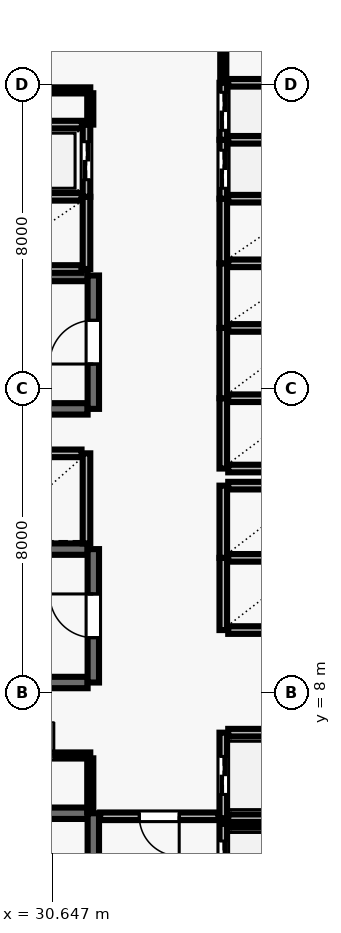
"""IFC4 building model, lengths in metres.
Left out: names, types, materials, properties, quantities, classifications, styles, units other than length and angle.
Written with IfcOpenShell. Run it as: python <this file> out.ifc"""

import sys

from ifc_helpers import new_model, si_unit, direction, frame, frame_2d, origin, place, context, subcontext, project, spatial, rectangle, extrude, element, fill, save


model = new_model("IFC4")
c1 = context("Model", 3, precision=1e-05, world=origin(), true_north=direction((0.0, 1.0)))
c2 = subcontext(c1, "Body", "Model", "MODEL_VIEW")
j1 = project(units=[si_unit("LENGTHUNIT", "METRE"), si_unit("PLANEANGLEUNIT", "RADIAN")], contexts=[c1])
p1 = place(None, origin())
s1 = spatial("IfcSite", under=j1, at=p1, CompositionType="ELEMENT")
p2 = place(p1, origin())
s2 = spatial("IfcBuilding", under=s1, at=p2, CompositionType="ELEMENT")
p3 = place(p2, frame((0.0, 0.0, 58.3)))
s3 = spatial("IfcBuildingStorey", under=s2, at=p3, CompositionType="ELEMENT", Elevation=58.3)
p4 = place(p3, frame((31.58, 4.83, 0.0), z_axis=(0.0, 0.0, 1.0), x_axis=(-1.0, 0.0, 0.0)))
e1 = element("IfcWall", 1, at=p4, inside=s3, PredefinedType="SHEAR", context=c2, shape_type="SweptSolid", body=[
    extrude(rectangle(XDim=8.36, YDim=0.3, at=frame_2d((4.18, 0.0))), origin(), (0.0, 0.0, 1.0), 3.69),
])
p5 = place(p3, frame((31.73, 0.96, 0.0), z_axis=(0.0, 0.0, 1.0), x_axis=(0.0, 1.0, 0.0)))
e2 = element("IfcWall", 2, at=p5, inside=s3, PredefinedType="SHEAR", context=c2, shape_type="SweptSolid", body=[
    extrude(rectangle(XDim=3.87, YDim=0.3, at=frame_2d((1.935, 0.0))), origin(), (0.0, 0.0, 1.0), 3.69),
])
p6 = place(p5, frame((1.54, 0.0, 0.0)))
e3 = element("IfcOpeningElement", 3, at=p6, cuts=e2, PredefinedType="OPENING", context=c2, shape_type="SweptSolid", body=[
    extrude(rectangle(XDim=1.15, YDim=2.15, at=frame_2d((0.575, 1.075))), frame((0.0, 0.16, 0.0), z_axis=(0.0, -1.0, 0.0), x_axis=(1.0, 0.0, 0.0)), (0.0, 0.0, 1.0), 0.32),
])
for number, where, z_axis, x_axis in (
    (4, (31.58, 18.98, 0.0), (0.0, 0.0, 1.0), (-1.0, 0.0, 0.0)),
    (5, (23.22, 15.47, 0.0), (0.0, 0.0, 1.0), (1.0, 0.0, 0.0)),
):
    element("IfcWall", number, at=place(p3, frame(where, z_axis=z_axis, x_axis=x_axis)), inside=s3, PredefinedType="SHEAR", context=c2, shape_type="SweptSolid", body=[
        extrude(rectangle(XDim=8.36, YDim=0.3, at=frame_2d((4.18, 0.0))), origin(), (0.0, 0.0, 1.0), 3.69),
    ])
p7 = place(p3, frame((31.73, 15.47, 0.0), z_axis=(0.0, 0.0, 1.0), x_axis=(0.0, 1.0, 0.0)))
e6 = element("IfcWall", 6, at=p7, inside=s3, PredefinedType="SHEAR", context=c2, shape_type="SweptSolid", body=[
    extrude(rectangle(XDim=3.51, YDim=0.3, at=frame_2d((1.755, 0.0))), origin(), (0.0, 0.0, 1.0), 3.69),
])
p8 = place(p7, frame((1.18, 0.0, 0.0)))
e7 = element("IfcOpeningElement", 7, at=p8, cuts=e6, PredefinedType="OPENING", context=c2, shape_type="SweptSolid", body=[
    extrude(rectangle(XDim=1.15, YDim=2.15, at=frame_2d((0.575, 1.075))), frame((0.0, 0.16, 0.0), z_axis=(0.0, -1.0, 0.0), x_axis=(1.0, 0.0, 0.0)), (0.0, 0.0, 1.0), 0.32),
])
for number, where, z_axis, x_axis in (
    (8, (31.58, 11.78, 0.0), (0.0, 0.0, 1.0), (-1.0, 0.0, 0.0)),
    (9, (23.22, 8.27, 0.0), (0.0, 0.0, 1.0), (1.0, 0.0, 0.0)),
):
    element("IfcWall", number, at=place(p3, frame(where, z_axis=z_axis, x_axis=x_axis)), inside=s3, PredefinedType="SHEAR", context=c2, shape_type="SweptSolid", body=[
        extrude(rectangle(XDim=8.36, YDim=0.3, at=frame_2d((4.18, 0.0))), origin(), (0.0, 0.0, 1.0), 3.69),
    ])
p9 = place(p3, frame((31.73, 8.27, 0.0), z_axis=(0.0, 0.0, 1.0), x_axis=(0.0, 1.0, 0.0)))
e10 = element("IfcWall", 10, at=p9, inside=s3, PredefinedType="SHEAR", context=c2, shape_type="SweptSolid", body=[
    extrude(rectangle(XDim=3.51, YDim=0.3, at=frame_2d((1.755, 0.0))), origin(), (0.0, 0.0, 1.0), 3.69),
])
p10 = place(p9, frame((1.18, 0.0, 0.0)))
e11 = element("IfcOpeningElement", 11, at=p10, cuts=e10, PredefinedType="OPENING", context=c2, shape_type="SweptSolid", body=[
    extrude(rectangle(XDim=1.15, YDim=2.15, at=frame_2d((0.575, 1.075))), frame((0.0, 0.16, 0.0), z_axis=(0.0, -1.0, 0.0), x_axis=(1.0, 0.0, 0.0)), (0.0, 0.0, 1.0), 0.32),
])
p11 = place(p3, frame((35.15, 4.55, 0.0), z_axis=(0.0, 0.0, 1.0), x_axis=(0.0, -1.0, 0.0)))
e12 = element("IfcWall", 12, at=p11, inside=s3, PredefinedType="SOLIDWALL", context=c2, shape_type="SweptSolid", body=[
    extrude(rectangle(XDim=2.1, YDim=0.2, at=frame_2d((1.05, 0.0))), origin(), (0.0, 0.0, 1.0), 3.69),
])
p12 = place(p11, frame((0.45, 0.0, 0.0)))
e13 = element("IfcOpeningElement", 13, at=p12, cuts=e12, PredefinedType="OPENING", context=c2, shape_type="SweptSolid", body=[
    extrude(rectangle(XDim=1.2, YDim=2.15, at=frame_2d((0.6, 1.075))), frame((0.0, 0.11, 0.0), z_axis=(0.0, -1.0, 0.0), x_axis=(1.0, 0.0, 0.0)), (0.0, 0.0, 1.0), 0.22),
])
p13 = place(p3, frame((37.42, 4.55, 0.0), z_axis=(0.0, 0.0, 1.0), x_axis=(-1.0, 0.0, 0.0)))
e14 = element("IfcWall", 14, at=p13, inside=s3, PredefinedType="SOLIDWALL", context=c2, shape_type="SweptSolid", body=[
    extrude(rectangle(XDim=2.14, YDim=0.2, at=frame_2d((1.07, 0.0))), origin(), (0.0, 0.0, 1.0), 3.69),
])
p14 = place(p3, frame((35.15, 6.95, 0.0), z_axis=(0.0, 0.0, 1.0), x_axis=(0.0, -1.0, 0.0)))
e15 = element("IfcWall", 15, at=p14, inside=s3, PredefinedType="SOLIDWALL", context=c2, shape_type="SweptSolid", body=[
    extrude(rectangle(XDim=2.25, YDim=0.2, at=frame_2d((1.125, 0.0))), origin(), (0.0, 0.0, 1.0), 3.69),
])
p15 = place(p14, frame((0.625, 0.0, 0.0)))
e16 = element("IfcOpeningElement", 16, at=p15, cuts=e15, PredefinedType="OPENING", context=c2, shape_type="SweptSolid", body=[
    extrude(rectangle(XDim=1.0, YDim=2.1, at=frame_2d((0.5, 1.05))), frame((0.0, 0.11, 0.0), z_axis=(0.0, -1.0, 0.0), x_axis=(1.0, 0.0, 0.0)), (0.0, 0.0, 1.0), 0.22),
])
for number, where, z_axis, x_axis in (
    (17, (35.28, 4.7, 0.0), (0.0, 0.0, 1.0), (1.0, 0.0, 0.0)),
    (18, (37.42, 6.95, 0.0), (0.0, 0.0, 1.0), (-1.0, 0.0, 0.0)),
):
    element("IfcWall", number, at=place(p3, frame(where, z_axis=z_axis, x_axis=x_axis)), inside=s3, PredefinedType="SOLIDWALL", context=c2, shape_type="SweptSolid", body=[
        extrude(rectangle(XDim=2.14, YDim=0.2, at=frame_2d((1.07, 0.0))), origin(), (0.0, 0.0, 1.0), 3.69),
    ])
p16 = place(p3, frame((35.15, 11.55, 0.0), z_axis=(0.0, 0.0, 1.0), x_axis=(0.0, -1.0, 0.0)))
e19 = element("IfcWall", 19, at=p16, inside=s3, PredefinedType="SOLIDWALL", context=c2, shape_type="SweptSolid", body=[
    extrude(rectangle(XDim=1.9, YDim=0.2, at=frame_2d((0.95, 0.0))), origin(), (0.0, 0.0, 1.0), 3.69),
])
for number, where, z_axis, x_axis in (
    (20, (35.28, 9.65, 0.0), (0.0, 0.0, 1.0), (1.0, 0.0, 0.0)),
    (21, (37.42, 11.55, 0.0), (0.0, 0.0, 1.0), (-1.0, 0.0, 0.0)),
):
    element("IfcWall", number, at=place(p3, frame(where, z_axis=z_axis, x_axis=x_axis)), inside=s3, PredefinedType="SOLIDWALL", context=c2, shape_type="SweptSolid", body=[
        extrude(rectangle(XDim=2.14, YDim=0.2, at=frame_2d((1.07, 0.0))), origin(), (0.0, 0.0, 1.0), 3.69),
    ])
p17 = place(p3, frame((35.15, 13.45, 0.0), z_axis=(0.0, 0.0, 1.0), x_axis=(0.0, -1.0, 0.0)))
e22 = element("IfcWall", 22, at=p17, inside=s3, PredefinedType="SOLIDWALL", context=c2, shape_type="SweptSolid", body=[
    extrude(rectangle(XDim=1.9, YDim=0.2, at=frame_2d((0.95, 0.0))), origin(), (0.0, 0.0, 1.0), 3.69),
])
p18 = place(p3, frame((37.42, 13.45, 0.0), z_axis=(0.0, 0.0, 1.0), x_axis=(-1.0, 0.0, 0.0)))
e23 = element("IfcWall", 23, at=p18, inside=s3, PredefinedType="SOLIDWALL", context=c2, shape_type="SweptSolid", body=[
    extrude(rectangle(XDim=2.14, YDim=0.2, at=frame_2d((1.07, 0.0))), origin(), (0.0, 0.0, 1.0), 3.69),
])
p19 = place(p3, frame((31.55, 11.93, 0.0), z_axis=(0.0, 0.0, 1.0), x_axis=(0.0, 1.0, 0.0)))
e24 = element("IfcWall", 24, at=p19, inside=s3, PredefinedType="SOLIDWALL", context=c2, shape_type="SweptSolid", body=[
    extrude(rectangle(XDim=2.37, YDim=0.2, at=frame_2d((1.185, 0.0))), origin(), (0.0, 0.0, 1.0), 3.69),
])
p20 = place(p3, frame((31.42, 14.3, 0.0), z_axis=(0.0, 0.0, 1.0), x_axis=(-1.0, 0.0, 0.0)))
e25 = element("IfcWall", 25, at=p20, inside=s3, PredefinedType="SOLIDWALL", context=c2, shape_type="SweptSolid", body=[
    extrude(rectangle(XDim=2.44, YDim=0.2, at=frame_2d((1.22, 0.0))), origin(), (0.0, 0.0, 1.0), 3.69),
])
p21 = place(p3, frame((35.15, 15.75, 0.0), z_axis=(0.0, 0.0, 1.0), x_axis=(0.0, -1.0, 0.0)))
e26 = element("IfcWall", 26, at=p21, inside=s3, PredefinedType="SOLIDWALL", context=c2, shape_type="SweptSolid", body=[
    extrude(rectangle(XDim=1.85, YDim=0.2, at=frame_2d((0.925, 0.0))), origin(), (0.0, 0.0, 1.0), 3.69),
])
for number, where, z_axis, x_axis in (
    (27, (35.28, 13.9, 0.0), (0.0, 0.0, 1.0), (1.0, 0.0, 0.0)),
    (28, (37.42, 15.75, 0.0), (0.0, 0.0, 1.0), (-1.0, 0.0, 0.0)),
):
    element("IfcWall", number, at=place(p3, frame(where, z_axis=z_axis, x_axis=x_axis)), inside=s3, PredefinedType="SOLIDWALL", context=c2, shape_type="SweptSolid", body=[
        extrude(rectangle(XDim=2.14, YDim=0.2, at=frame_2d((1.07, 0.0))), origin(), (0.0, 0.0, 1.0), 3.69),
    ])
p22 = place(p3, frame((35.15, 17.6, 0.0), z_axis=(0.0, 0.0, 1.0), x_axis=(0.0, -1.0, 0.0)))
e29 = element("IfcWall", 29, at=p22, inside=s3, PredefinedType="SOLIDWALL", context=c2, shape_type="SweptSolid", body=[
    extrude(rectangle(XDim=1.85, YDim=0.2, at=frame_2d((0.925, 0.0))), origin(), (0.0, 0.0, 1.0), 3.69),
])
p23 = place(p3, frame((37.42, 17.6, 0.0), z_axis=(0.0, 0.0, 1.0), x_axis=(-1.0, 0.0, 0.0)))
e30 = element("IfcWall", 30, at=p23, inside=s3, PredefinedType="SOLIDWALL", context=c2, shape_type="SweptSolid", body=[
    extrude(rectangle(XDim=2.14, YDim=0.2, at=frame_2d((1.07, 0.0))), origin(), (0.0, 0.0, 1.0), 3.69),
])
p24 = place(p3, frame((35.15, 19.3, 0.0), z_axis=(0.0, 0.0, 1.0), x_axis=(0.0, -1.0, 0.0)))
e31 = element("IfcWall", 31, at=p24, inside=s3, PredefinedType="SOLIDWALL", context=c2, shape_type="SweptSolid", body=[
    extrude(rectangle(XDim=1.7, YDim=0.2, at=frame_2d((0.85, 0.0))), origin(), (0.0, 0.0, 1.0), 3.69),
])
p25 = place(p3, frame((37.42, 19.3, 0.0), z_axis=(0.0, 0.0, 1.0), x_axis=(-1.0, 0.0, 0.0)))
e32 = element("IfcWall", 32, at=p25, inside=s3, PredefinedType="SOLIDWALL", context=c2, shape_type="SweptSolid", body=[
    extrude(rectangle(XDim=2.14, YDim=0.2, at=frame_2d((1.07, 0.0))), origin(), (0.0, 0.0, 1.0), 3.69),
])
p26 = place(p3, frame((35.15, 21.0, 0.0), z_axis=(0.0, 0.0, 1.0), x_axis=(0.0, -1.0, 0.0)))
e33 = element("IfcWall", 33, at=p26, inside=s3, PredefinedType="SOLIDWALL", context=c2, shape_type="SweptSolid", body=[
    extrude(rectangle(XDim=1.7, YDim=0.2, at=frame_2d((0.85, 0.0))), origin(), (0.0, 0.0, 1.0), 3.69),
])
p27 = place(p3, frame((37.42, 21.0, 0.0), z_axis=(0.0, 0.0, 1.0), x_axis=(-1.0, 0.0, 0.0)))
e34 = element("IfcWall", 34, at=p27, inside=s3, PredefinedType="SOLIDWALL", context=c2, shape_type="SweptSolid", body=[
    extrude(rectangle(XDim=2.14, YDim=0.2, at=frame_2d((1.07, 0.0))), origin(), (0.0, 0.0, 1.0), 3.69),
])
p28 = place(p3, frame((31.55, 19.15, 0.0), z_axis=(0.0, 0.0, 1.0), x_axis=(0.0, 1.0, 0.0)))
e35 = element("IfcWall", 35, at=p28, inside=s3, PredefinedType="SOLIDWALL", context=c2, shape_type="SweptSolid", body=[
    extrude(rectangle(XDim=1.9, YDim=0.2, at=frame_2d((0.95, 0.0))), origin(), (0.0, 0.0, 1.0), 3.69),
])
for number, where, z_axis, x_axis in (
    (36, (28.98, 19.15, 0.0), (0.0, 0.0, 1.0), (1.0, 0.0, 0.0)),
    (37, (31.42, 21.05, 0.0), (0.0, 0.0, 1.0), (-1.0, 0.0, 0.0)),
):
    element("IfcWall", number, at=place(p3, frame(where, z_axis=z_axis, x_axis=x_axis)), inside=s3, PredefinedType="SOLIDWALL", context=c2, shape_type="SweptSolid", body=[
        extrude(rectangle(XDim=2.44, YDim=0.2, at=frame_2d((1.22, 0.0))), origin(), (0.0, 0.0, 1.0), 3.69),
    ])
p29 = place(p3, frame((35.15, 22.55, 0.0), z_axis=(0.0, 0.0, 1.0), x_axis=(0.0, -1.0, 0.0)))
e38 = element("IfcWall", 38, at=p29, inside=s3, PredefinedType="SOLIDWALL", context=c2, shape_type="SweptSolid", body=[
    extrude(rectangle(XDim=1.55, YDim=0.2, at=frame_2d((0.775, 0.0))), origin(), (0.0, 0.0, 1.0), 3.69),
])
p30 = place(p29, frame((0.275, 0.0, 0.0)))
e39 = element("IfcOpeningElement", 39, at=p30, cuts=e38, PredefinedType="OPENING", context=c2, shape_type="SweptSolid", body=[
    extrude(rectangle(XDim=1.0, YDim=2.1, at=frame_2d((0.5, 1.05))), frame((0.0, 0.11, 0.0), z_axis=(0.0, -1.0, 0.0), x_axis=(1.0, 0.0, 0.0)), (0.0, 0.0, 1.0), 0.22),
])
p31 = place(p3, frame((37.42, 22.55, 0.0), z_axis=(0.0, 0.0, 1.0), x_axis=(-1.0, 0.0, 0.0)))
e40 = element("IfcWall", 40, at=p31, inside=s3, PredefinedType="SOLIDWALL", context=c2, shape_type="SweptSolid", body=[
    extrude(rectangle(XDim=2.14, YDim=0.2, at=frame_2d((1.07, 0.0))), origin(), (0.0, 0.0, 1.0), 3.69),
])
p32 = place(p3, frame((35.15, 24.05, 0.0), z_axis=(0.0, 0.0, 1.0), x_axis=(0.0, -1.0, 0.0)))
e41 = element("IfcWall", 41, at=p32, inside=s3, PredefinedType="SOLIDWALL", context=c2, shape_type="SweptSolid", body=[
    extrude(rectangle(XDim=1.5, YDim=0.2, at=frame_2d((0.75, 0.0))), origin(), (0.0, 0.0, 1.0), 3.69),
])
p33 = place(p32, frame((0.25, 0.0, 0.0)))
e42 = element("IfcOpeningElement", 42, at=p33, cuts=e41, PredefinedType="OPENING", context=c2, shape_type="SweptSolid", body=[
    extrude(rectangle(XDim=1.0, YDim=2.1, at=frame_2d((0.5, 1.05))), frame((0.0, 0.11, 0.0), z_axis=(0.0, -1.0, 0.0), x_axis=(1.0, 0.0, 0.0)), (0.0, 0.0, 1.0), 0.22),
])
p34 = place(p3, frame((37.42, 24.05, 0.0), z_axis=(0.0, 0.0, 1.0), x_axis=(-1.0, 0.0, 0.0)))
e43 = element("IfcWall", 43, at=p34, inside=s3, PredefinedType="SOLIDWALL", context=c2, shape_type="SweptSolid", body=[
    extrude(rectangle(XDim=2.14, YDim=0.2, at=frame_2d((1.07, 0.0))), origin(), (0.0, 0.0, 1.0), 3.69),
])
p35 = place(p3, frame((31.55, 21.05, 0.0), z_axis=(0.0, 0.0, 1.0), x_axis=(0.0, 1.0, 0.0)))
e44 = element("IfcWall", 44, at=p35, inside=s3, PredefinedType="SOLIDWALL", context=c2, shape_type="SweptSolid", body=[
    extrude(rectangle(XDim=1.9, YDim=0.2, at=frame_2d((0.95, 0.0))), origin(), (0.0, 0.0, 1.0), 3.69),
])
p36 = place(p35, frame((0.45, 0.0, 0.0)))
e45 = element("IfcOpeningElement", 45, at=p36, cuts=e44, PredefinedType="OPENING", context=c2, shape_type="SweptSolid", body=[
    extrude(rectangle(XDim=1.0, YDim=2.1, at=frame_2d((0.5, 1.05))), frame((0.0, 0.11, 0.0), z_axis=(0.0, -1.0, 0.0), x_axis=(1.0, 0.0, 0.0)), (0.0, 0.0, 1.0), 0.22),
])
p37 = place(p3, frame((31.43, 22.95, 0.0), z_axis=(0.0, 0.0, 1.0), x_axis=(-1.0, 0.0, 0.0)))
e46 = element("IfcWall", 46, at=p37, inside=s3, PredefinedType="SOLIDWALL", context=c2, shape_type="SweptSolid", body=[
    extrude(rectangle(XDim=2.46, YDim=0.2, at=frame_2d((1.23, 0.0))), origin(), (0.0, 0.0, 1.0), 3.69),
])
p38 = place(p3, frame((28.8, 23.85, 0.0), z_axis=(0.0, 0.0, 1.0), x_axis=(1.0, 0.0, 0.0)))
e47 = element("IfcWall", 47, at=p38, inside=s3, PredefinedType="PARTITIONING", context=c2, shape_type="SweptSolid", body=[
    extrude(rectangle(XDim=2.85, YDim=0.16, at=frame_2d((1.425, 0.0))), origin(), (0.0, 0.0, 1.0), 3.69),
])
p39 = place(p3, frame((28.85, 6.35, 0.0), z_axis=(0.0, 0.0, 1.0), x_axis=(1.0, 0.0, 0.0)))
e48 = element("IfcWall", 48, at=p39, inside=s3, PredefinedType="PARTITIONING", context=c2, shape_type="SweptSolid", body=[
    extrude(rectangle(XDim=2.8, YDim=0.16, at=frame_2d((1.4, 0.0))), origin(), (0.0, 0.0, 1.0), 3.69),
])
p40 = place(p39, frame((0.96, 0.0, 0.0)))
e49 = element("IfcOpeningElement", 49, at=p40, cuts=e48, PredefinedType="OPENING", context=c2, shape_type="SweptSolid", body=[
    extrude(rectangle(XDim=0.88, YDim=2.1, at=frame_2d((0.44, 1.05))), frame((0.0, 0.09, 0.0), z_axis=(0.0, -1.0, 0.0), x_axis=(1.0, 0.0, 0.0)), (0.0, 0.0, 1.0), 0.18),
])
p41 = place(p3, frame((35.02, 4.75, 0.0), z_axis=(0.0, 0.0, 1.0), x_axis=(-1.0, 0.0, 0.0)))
e50 = element("IfcWall", 50, at=p41, inside=s3, PredefinedType="SOLIDWALL", context=c2, shape_type="SweptSolid", body=[
    extrude(rectangle(XDim=3.11, YDim=0.2, at=frame_2d((1.555, 0.0))), origin(), (0.0, 0.0, 1.0), 3.69),
])
p42 = place(p41, frame((1.03, 0.0, 0.0)))
e51 = element("IfcOpeningElement", 51, at=p42, cuts=e50, PredefinedType="OPENING", context=c2, shape_type="SweptSolid", body=[
    extrude(rectangle(XDim=1.05, YDim=2.15, at=frame_2d((0.525, 1.075))), frame((0.0, 0.11, 0.0), z_axis=(0.0, -1.0, 0.0), x_axis=(1.0, 0.0, 0.0)), (0.0, 0.0, 1.0), 0.22),
])
p43 = place(p3, frame((31.65, 4.86, 0.0), z_axis=(0.0, 0.0, 1.0), x_axis=(0.0, 1.0, 0.0)))
e52 = element("IfcWall", 52, at=p43, inside=s3, PredefinedType="PARTITIONING", context=c2, shape_type="SweptSolid", body=[
    extrude(rectangle(XDim=1.415, YDim=0.16, at=frame_2d((0.708, 0.0))), origin(), (0.0, 0.0, 1.0), 3.69),
])
p44 = place(p3, frame((31.65, 23.775, 0.0), z_axis=(0.0, 0.0, 1.0), x_axis=(0.0, -1.0, 0.0)))
e53 = element("IfcWall", 53, at=p44, inside=s3, PredefinedType="PARTITIONING", context=c2, shape_type="SweptSolid", body=[
    extrude(rectangle(XDim=0.825, YDim=0.16, at=frame_2d((0.413, 0.0))), origin(), (0.0, 0.0, 1.0), 3.69),
])
p45 = place(p3, frame((35.15, 24.07, 0.0), z_axis=(0.0, 0.0, 1.0), x_axis=(0.0, 1.0, 0.0)))
e54 = element("IfcWall", 54, at=p45, inside=s3, PredefinedType="PARTITIONING", context=c2, shape_type="SweptSolid", body=[
    extrude(rectangle(XDim=1.855, YDim=0.16, at=frame_2d((0.927, 0.0))), origin(), (0.0, 0.0, 1.0), 3.69),
])
p46 = place(p8, origin())
e55 = element("IfcDoor", 55, at=p46, inside=s3, OperationType="SINGLE_SWING_LEFT", PredefinedType="DOOR", context=c2, shape_type="SweptSolid", body=[
    extrude(rectangle(XDim=1.15, YDim=2.15, at=frame_2d((0.575, 1.075))), frame((0.0, 0.025, 0.0), z_axis=(0.0, -1.0, 0.0), x_axis=(1.0, 0.0, 0.0)), (0.0, 0.0, 1.0), 0.05),
])
fill(e7, e55)
p47 = place(p10, origin())
e56 = element("IfcDoor", 56, at=p47, inside=s3, OperationType="SINGLE_SWING_RIGHT", PredefinedType="DOOR", context=c2, shape_type="SweptSolid", body=[
    extrude(rectangle(XDim=1.15, YDim=2.15, at=frame_2d((0.575, 1.075))), frame((0.0, 0.025, 0.0), z_axis=(0.0, -1.0, 0.0), x_axis=(1.0, 0.0, 0.0)), (0.0, 0.0, 1.0), 0.05),
])
fill(e11, e56)
p48 = place(p12, origin())
e57 = element("IfcDoor", 57, at=p48, inside=s3, OperationType="DOUBLE_DOOR_SLIDING", PredefinedType="DOOR", context=c2, shape_type="SweptSolid", body=[
    extrude(rectangle(XDim=1.2, YDim=2.15, at=frame_2d((0.6, 1.075))), frame((0.0, 0.025, 0.0), z_axis=(0.0, -1.0, 0.0), x_axis=(1.0, 0.0, 0.0)), (0.0, 0.0, 1.0), 0.05),
])
fill(e13, e57)
p49 = place(p15, origin())
e58 = element("IfcDoor", 58, at=p49, inside=s3, OperationType="DOUBLE_DOOR_SLIDING", PredefinedType="DOOR", context=c2, shape_type="SweptSolid", body=[
    extrude(rectangle(XDim=1.0, YDim=2.1, at=frame_2d((0.5, 1.05))), frame((0.0, 0.025, 0.0), z_axis=(0.0, -1.0, 0.0), x_axis=(1.0, 0.0, 0.0)), (0.0, 0.0, 1.0), 0.05),
])
fill(e16, e58)
p50 = place(p30, origin())
e59 = element("IfcDoor", 59, at=p50, inside=s3, OperationType="DOUBLE_DOOR_SLIDING", PredefinedType="DOOR", context=c2, shape_type="SweptSolid", body=[
    extrude(rectangle(XDim=1.0, YDim=2.1, at=frame_2d((0.5, 1.05))), frame((0.0, 0.025, 0.0), z_axis=(0.0, -1.0, 0.0), x_axis=(1.0, 0.0, 0.0)), (0.0, 0.0, 1.0), 0.05),
])
fill(e39, e59)
p51 = place(p33, origin())
e60 = element("IfcDoor", 60, at=p51, inside=s3, OperationType="DOUBLE_DOOR_SLIDING", PredefinedType="DOOR", context=c2, shape_type="SweptSolid", body=[
    extrude(rectangle(XDim=1.0, YDim=2.1, at=frame_2d((0.5, 1.05))), frame((0.0, 0.025, 0.0), z_axis=(0.0, -1.0, 0.0), x_axis=(1.0, 0.0, 0.0)), (0.0, 0.0, 1.0), 0.05),
])
fill(e42, e60)
p52 = place(p36, origin())
e61 = element("IfcDoor", 61, at=p52, inside=s3, OperationType="DOUBLE_DOOR_SLIDING", PredefinedType="DOOR", context=c2, shape_type="SweptSolid", body=[
    extrude(rectangle(XDim=1.0, YDim=2.1, at=frame_2d((0.5, 1.05))), frame((0.0, 0.025, 0.0), z_axis=(0.0, -1.0, 0.0), x_axis=(1.0, 0.0, 0.0)), (0.0, 0.0, 1.0), 0.05),
])
fill(e45, e61)
p53 = place(p42, origin())
e62 = element("IfcDoor", 62, at=p53, inside=s3, OperationType="SINGLE_SWING_LEFT", PredefinedType="DOOR", context=c2, shape_type="SweptSolid", body=[
    extrude(rectangle(XDim=1.05, YDim=2.15, at=frame_2d((0.525, 1.075))), frame((0.0, 0.025, 0.0), z_axis=(0.0, -1.0, 0.0), x_axis=(1.0, 0.0, 0.0)), (0.0, 0.0, 1.0), 0.05),
])
fill(e51, e62)
p54 = place(p40, origin())
e63 = element("IfcDoor", 63, at=p54, inside=s3, OperationType="SINGLE_SWING_RIGHT", PredefinedType="DOOR", context=c2, shape_type="SweptSolid", body=[
    extrude(rectangle(XDim=0.88, YDim=2.1, at=frame_2d((0.44, 1.05))), frame((0.0, 0.025, 0.0), z_axis=(0.0, -1.0, 0.0), x_axis=(1.0, 0.0, 0.0)), (0.0, 0.0, 1.0), 0.05),
])
fill(e49, e63)
save(model, sys.argv[1])
